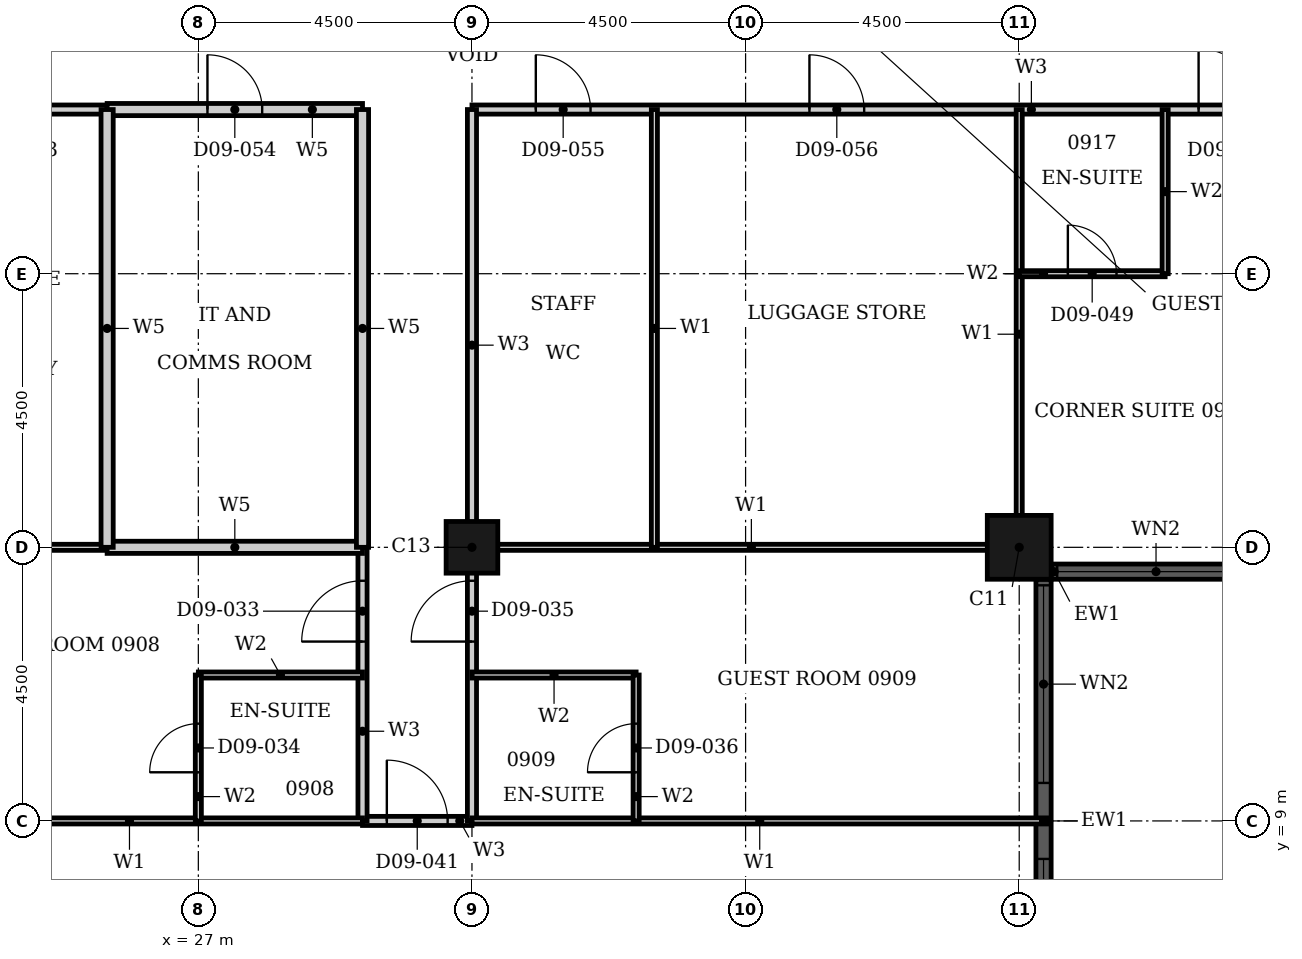
"""IFC4 building model, lengths in metres.
Left out: names, types, materials, properties, quantities, classifications, styles, units other than length and angle.
Written with IfcOpenShell. Run it as: python <this file> out.ifc"""

import sys

from ifc_helpers import new_model, si_unit, direction, frame, frame_2d, origin, origin_2d, place, context, subcontext, project, spatial, rectangle, hollow_rectangle, extrude, element, fill, save


model = new_model("IFC4")
c1 = context("Model", 3, precision=1e-05, world=origin(), true_north=direction((0.0, 1.0)))
c2 = subcontext(c1, "Body", "Model", "MODEL_VIEW")
j1 = project(units=[si_unit("LENGTHUNIT", "METRE"), si_unit("PLANEANGLEUNIT", "RADIAN")], contexts=[c1])
p1 = place(None, origin())
s1 = spatial("IfcSite", under=j1, at=p1, CompositionType="ELEMENT")
p2 = place(p1, origin())
s2 = spatial("IfcBuilding", under=s1, at=p2, CompositionType="ELEMENT")
p3 = place(p2, frame((0.0, 0.0, 44.4)))
s3 = spatial("IfcBuildingStorey", under=s2, at=p3, CompositionType="ELEMENT", Elevation=44.4)
p4 = place(p3, frame((40.5, 13.5, 0.0), z_axis=(0.0, 0.0, 1.0), x_axis=(1.0, 0.0, 0.0)))
e1 = element("IfcColumn", 1, at=p4, inside=s3, PredefinedType="COLUMN", context=c2, shape_type="SweptSolid", body=[
    extrude(hollow_rectangle(XDim=1.05, YDim=1.05, WallThickness=0.034, at=origin_2d()), origin(), (0.0, 0.0, 1.0), 3.6),
])
p5 = place(p3, frame((31.5, 13.5, 0.0), z_axis=(0.0, 0.0, 1.0), x_axis=(1.0, 0.0, 0.0)))
e2 = element("IfcColumn", 2, at=p5, inside=s3, PredefinedType="COLUMN", context=c2, shape_type="SweptSolid", body=[
    extrude(hollow_rectangle(XDim=0.85, YDim=0.85, WallThickness=0.026, at=origin_2d()), origin(), (0.0, 0.0, 1.0), 3.6),
])
p6 = place(p3, frame((40.9, 5.025, 0.0), z_axis=(0.0, 0.0, 1.0), x_axis=(0.0, 1.0, 0.0)))
e3 = element("IfcWall", 3, at=p6, inside=s3, PredefinedType="SOLIDWALL", context=c2, shape_type="SweptSolid", body=[
    extrude(rectangle(XDim=7.95, YDim=0.25, at=frame_2d((3.975, 0.0))), origin(), (0.0, 0.0, 1.0), 3.6),
])
p7 = place(p6, frame((0.1, 0.0, 0.9)))
e4 = element("IfcOpeningElement", 4, at=p7, cuts=e3, PredefinedType="OPENING", context=c2, shape_type="SweptSolid", body=[
    extrude(rectangle(XDim=3.25, YDim=2.08, at=frame_2d((1.625, 1.04))), frame((0.0, 0.135, 0.0), z_axis=(0.0, -1.0, 0.0), x_axis=(1.0, 0.0, 0.0)), (0.0, 0.0, 1.0), 0.27),
])
p8 = place(p6, frame((4.6, 0.0, 0.9)))
e5 = element("IfcOpeningElement", 5, at=p8, cuts=e3, PredefinedType="OPENING", context=c2, shape_type="SweptSolid", body=[
    extrude(rectangle(XDim=3.25, YDim=2.08, at=frame_2d((1.625, 1.04))), frame((0.0, 0.135, 0.0), z_axis=(0.0, -1.0, 0.0), x_axis=(1.0, 0.0, 0.0)), (0.0, 0.0, 1.0), 0.27),
])
p9 = place(p3, frame((41.025, 13.1, 0.0), z_axis=(0.0, 0.0, 1.0), x_axis=(1.0, 0.0, 0.0)))
e6 = element("IfcWall", 6, at=p9, inside=s3, PredefinedType="SOLIDWALL", context=c2, shape_type="SweptSolid", body=[
    extrude(rectangle(XDim=3.45, YDim=0.25, at=frame_2d((1.725, 0.0))), origin(), (0.0, 0.0, 1.0), 3.6),
])
p10 = place(p9, frame((0.1, 0.0, 0.9)))
e7 = element("IfcOpeningElement", 7, at=p10, cuts=e6, PredefinedType="OPENING", context=c2, shape_type="SweptSolid", body=[
    extrude(rectangle(XDim=3.25, YDim=2.08, at=frame_2d((1.625, 1.04))), frame((0.0, 0.135, 0.0), z_axis=(0.0, -1.0, 0.0), x_axis=(1.0, 0.0, 0.0)), (0.0, 0.0, 1.0), 0.27),
])
p11 = place(p3, frame((16.2, 20.7, 0.0), z_axis=(0.0, 0.0, 1.0), x_axis=(1.0, 0.0, 0.0)))
e8 = element("IfcWall", 8, at=p11, inside=s3, PredefinedType="PARTITIONING", context=c2, shape_type="SweptSolid", body=[
    extrude(rectangle(XDim=9.3, YDim=0.15, at=frame_2d((4.65, 0.0))), origin(), (0.0, 0.0, 1.0), 3.2),
])
p12 = place(p11, frame((4.75, 0.0, 0.0)))
e9 = element("IfcOpeningElement", 9, at=p12, cuts=e8, PredefinedType="OPENING", context=c2, shape_type="SweptSolid", body=[
    extrude(rectangle(XDim=1.0, YDim=2.1, at=frame_2d((0.5, 1.05))), frame((0.0, 0.085, 0.0), z_axis=(0.0, -1.0, 0.0), x_axis=(1.0, 0.0, 0.0)), (0.0, 0.0, 1.0), 0.17),
])
p13 = place(p11, frame((7.35, 0.0, 0.0)))
e10 = element("IfcOpeningElement", 10, at=p13, cuts=e8, PredefinedType="OPENING", context=c2, shape_type="SweptSolid", body=[
    extrude(rectangle(XDim=0.9, YDim=2.1, at=frame_2d((0.45, 1.05))), frame((0.0, 0.085, 0.0), z_axis=(0.0, -1.0, 0.0), x_axis=(1.0, 0.0, 0.0)), (0.0, 0.0, 1.0), 0.17),
])
p14 = place(p3, frame((31.5, 20.7, 0.0), z_axis=(0.0, 0.0, 1.0), x_axis=(1.0, 0.0, 0.0)))
e11 = element("IfcWall", 11, at=p14, inside=s3, PredefinedType="PARTITIONING", context=c2, shape_type="SweptSolid", body=[
    extrude(rectangle(XDim=15.3, YDim=0.15, at=frame_2d((7.65, 0.0))), origin(), (0.0, 0.0, 1.0), 3.2),
])
p15 = place(p14, frame((11.95, 0.0, 0.0)))
e12 = element("IfcOpeningElement", 12, at=p15, cuts=e11, PredefinedType="OPENING", context=c2, shape_type="SweptSolid", body=[
    extrude(rectangle(XDim=1.0, YDim=2.1, at=frame_2d((0.5, 1.05))), frame((0.0, 0.085, 0.0), z_axis=(0.0, -1.0, 0.0), x_axis=(1.0, 0.0, 0.0)), (0.0, 0.0, 1.0), 0.17),
])
p16 = place(p14, frame((1.05, 0.0, 0.0)))
e13 = element("IfcOpeningElement", 13, at=p16, cuts=e11, PredefinedType="OPENING", context=c2, shape_type="SweptSolid", body=[
    extrude(rectangle(XDim=0.9, YDim=2.1, at=frame_2d((0.45, 1.05))), frame((0.0, 0.085, 0.0), z_axis=(0.0, -1.0, 0.0), x_axis=(1.0, 0.0, 0.0)), (0.0, 0.0, 1.0), 0.17),
])
p17 = place(p14, frame((5.55, 0.0, 0.0)))
e14 = element("IfcOpeningElement", 14, at=p17, cuts=e11, PredefinedType="OPENING", context=c2, shape_type="SweptSolid", body=[
    extrude(rectangle(XDim=0.9, YDim=2.1, at=frame_2d((0.45, 1.05))), frame((0.0, 0.085, 0.0), z_axis=(0.0, -1.0, 0.0), x_axis=(1.0, 0.0, 0.0)), (0.0, 0.0, 1.0), 0.17),
])
p18 = place(p3, frame((29.7, 9.0, 0.0), z_axis=(0.0, 0.0, 1.0), x_axis=(1.0, 0.0, 0.0)))
e15 = element("IfcWall", 15, at=p18, inside=s3, PredefinedType="PARTITIONING", context=c2, shape_type="SweptSolid", body=[
    extrude(rectangle(XDim=1.8, YDim=0.15, at=frame_2d((0.9, 0.0))), origin(), (0.0, 0.0, 1.0), 3.2),
])
p19 = place(p18, frame((0.4, 0.0, 0.0)))
e16 = element("IfcOpeningElement", 16, at=p19, cuts=e15, PredefinedType="OPENING", context=c2, shape_type="SweptSolid", body=[
    extrude(rectangle(XDim=1.0, YDim=2.1, at=frame_2d((0.5, 1.05))), frame((0.0, 0.085, 0.0), z_axis=(0.0, -1.0, 0.0), x_axis=(1.0, 0.0, 0.0)), (0.0, 0.0, 1.0), 0.17),
])
p20 = place(p3, frame((29.7, 9.0, 0.0), z_axis=(0.0, 0.0, 1.0), x_axis=(0.0, 1.0, 0.0)))
e17 = element("IfcWall", 17, at=p20, inside=s3, PredefinedType="PARTITIONING", context=c2, shape_type="SweptSolid", body=[
    extrude(rectangle(XDim=4.5, YDim=0.15, at=frame_2d((2.25, 0.0))), origin(), (0.0, 0.0, 1.0), 3.2),
])
p21 = place(p20, frame((2.95, 0.0, 0.0)))
e18 = element("IfcOpeningElement", 18, at=p21, cuts=e17, PredefinedType="OPENING", context=c2, shape_type="SweptSolid", body=[
    extrude(rectangle(XDim=1.0, YDim=2.1, at=frame_2d((0.5, 1.05))), frame((0.0, 0.085, 0.0), z_axis=(0.0, -1.0, 0.0), x_axis=(1.0, 0.0, 0.0)), (0.0, 0.0, 1.0), 0.17),
])
p22 = place(p3, frame((31.5, 9.0, 0.0), z_axis=(0.0, 0.0, 1.0), x_axis=(0.0, 1.0, 0.0)))
e19 = element("IfcWall", 19, at=p22, inside=s3, PredefinedType="PARTITIONING", context=c2, shape_type="SweptSolid", body=[
    extrude(rectangle(XDim=11.7, YDim=0.15, at=frame_2d((5.85, 0.0))), origin(), (0.0, 0.0, 1.0), 2.48),
])
p23 = place(p22, frame((2.95, 0.0, 0.0)))
e20 = element("IfcOpeningElement", 20, at=p23, cuts=e19, PredefinedType="OPENING", context=c2, shape_type="SweptSolid", body=[
    extrude(rectangle(XDim=1.0, YDim=2.1, at=frame_2d((0.5, 1.05))), frame((0.0, 0.085, 0.0), z_axis=(0.0, -1.0, 0.0), x_axis=(1.0, 0.0, 0.0)), (0.0, 0.0, 1.0), 0.17),
])
p24 = place(p3, frame((31.5, 13.5, 0.0), z_axis=(0.0, 0.0, 1.0), x_axis=(1.0, 0.0, 0.0)))
e21 = element("IfcWall", 21, at=p24, inside=s3, PredefinedType="PARTITIONING", context=c2, shape_type="SweptSolid", body=[
    extrude(rectangle(XDim=9.19, YDim=0.1, at=frame_2d((4.595, 0.0))), origin(), (0.0, 0.0, 1.0), 2.28),
])
p25 = place(p3, frame((22.31, 13.5, 0.0), z_axis=(0.0, 0.0, 1.0), x_axis=(1.0, 0.0, 0.0)))
e22 = element("IfcWall", 22, at=p25, inside=s3, PredefinedType="PARTITIONING", context=c2, shape_type="SweptSolid", body=[
    extrude(rectangle(XDim=3.19, YDim=0.1, at=frame_2d((1.595, 0.0))), origin(), (0.0, 0.0, 1.0), 2.28),
])
p26 = place(p3, frame((31.5, 9.0, 0.0), z_axis=(0.0, 0.0, 1.0), x_axis=(1.0, 0.0, 0.0)))
e23 = element("IfcWall", 23, at=p26, inside=s3, PredefinedType="PARTITIONING", context=c2, shape_type="SweptSolid", body=[
    extrude(rectangle(XDim=9.465, YDim=0.1, at=frame_2d((4.732, 0.0))), origin(), (0.0, 0.0, 1.0), 3.2),
])
p27 = place(p3, frame((22.035, 9.0, 0.0), z_axis=(0.0, 0.0, 1.0), x_axis=(1.0, 0.0, 0.0)))
e24 = element("IfcWall", 24, at=p27, inside=s3, PredefinedType="PARTITIONING", context=c2, shape_type="SweptSolid", body=[
    extrude(rectangle(XDim=7.665, YDim=0.1, at=frame_2d((3.833, 0.0))), origin(), (0.0, 0.0, 1.0), 3.2),
])
p28 = place(p3, frame((34.5, 13.5, 0.0), z_axis=(0.0, 0.0, 1.0), x_axis=(0.0, 1.0, 0.0)))
e25 = element("IfcWall", 25, at=p28, inside=s3, PredefinedType="PARTITIONING", context=c2, shape_type="SweptSolid", body=[
    extrude(rectangle(XDim=7.2, YDim=0.1, at=frame_2d((3.6, 0.0))), origin(), (0.0, 0.0, 1.0), 3.2),
])
p29 = place(p3, frame((40.5, 13.31, 0.0), z_axis=(0.0, 0.0, 1.0), x_axis=(0.0, 1.0, 0.0)))
e26 = element("IfcWall", 26, at=p29, inside=s3, PredefinedType="PARTITIONING", context=c2, shape_type="SweptSolid", body=[
    extrude(rectangle(XDim=7.39, YDim=0.1, at=frame_2d((3.695, 0.0))), origin(), (0.0, 0.0, 1.0), 3.2),
])
for number, where, z_axis, x_axis in (
    (27, (31.5, 11.4, 0.0), (0.0, 0.0, 1.0), (1.0, 0.0, 0.0)),
    (28, (27.0, 11.4, 0.0), (0.0, 0.0, 1.0), (1.0, 0.0, 0.0)),
):
    element("IfcWall", number, at=place(p3, frame(where, z_axis=z_axis, x_axis=x_axis)), inside=s3, PredefinedType="PARTITIONING", context=c2, shape_type="SweptSolid", body=[
        extrude(rectangle(XDim=2.7, YDim=0.1, at=frame_2d((1.35, 0.0))), origin(), (0.0, 0.0, 1.0), 3.2),
    ])
p30 = place(p3, frame((40.5, 18.0, 0.0), z_axis=(0.0, 0.0, 1.0), x_axis=(1.0, 0.0, 0.0)))
e29 = element("IfcWall", 29, at=p30, inside=s3, PredefinedType="PARTITIONING", context=c2, shape_type="SweptSolid", body=[
    extrude(rectangle(XDim=2.4, YDim=0.1, at=frame_2d((1.2, 0.0))), origin(), (0.0, 0.0, 1.0), 3.2),
])
p31 = place(p30, frame((0.8, 0.0, 0.0)))
e30 = element("IfcOpeningElement", 30, at=p31, cuts=e29, PredefinedType="OPENING", context=c2, shape_type="SweptSolid", body=[
    extrude(rectangle(XDim=0.8, YDim=2.1, at=frame_2d((0.4, 1.05))), frame((0.0, 0.06, 0.0), z_axis=(0.0, -1.0, 0.0), x_axis=(1.0, 0.0, 0.0)), (0.0, 0.0, 1.0), 0.12),
])
p32 = place(p3, frame((27.0, 9.0, 0.0), z_axis=(0.0, 0.0, 1.0), x_axis=(0.0, 1.0, 0.0)))
e31 = element("IfcWall", 31, at=p32, inside=s3, PredefinedType="PARTITIONING", context=c2, shape_type="SweptSolid", body=[
    extrude(rectangle(XDim=2.4, YDim=0.1, at=frame_2d((1.2, 0.0))), origin(), (0.0, 0.0, 1.0), 2.48),
])
p33 = place(p32, frame((0.8, 0.0, 0.0)))
e32 = element("IfcOpeningElement", 32, at=p33, cuts=e31, PredefinedType="OPENING", context=c2, shape_type="SweptSolid", body=[
    extrude(rectangle(XDim=0.8, YDim=2.1, at=frame_2d((0.4, 1.05))), frame((0.0, 0.06, 0.0), z_axis=(0.0, -1.0, 0.0), x_axis=(1.0, 0.0, 0.0)), (0.0, 0.0, 1.0), 0.12),
])
p34 = place(p3, frame((34.2, 9.0, 0.0), z_axis=(0.0, 0.0, 1.0), x_axis=(0.0, 1.0, 0.0)))
e33 = element("IfcWall", 33, at=p34, inside=s3, PredefinedType="PARTITIONING", context=c2, shape_type="SweptSolid", body=[
    extrude(rectangle(XDim=2.4, YDim=0.1, at=frame_2d((1.2, 0.0))), origin(), (0.0, 0.0, 1.0), 3.2),
])
p35 = place(p34, frame((0.8, 0.0, 0.0)))
e34 = element("IfcOpeningElement", 34, at=p35, cuts=e33, PredefinedType="OPENING", context=c2, shape_type="SweptSolid", body=[
    extrude(rectangle(XDim=0.8, YDim=2.1, at=frame_2d((0.4, 1.05))), frame((0.0, 0.06, 0.0), z_axis=(0.0, -1.0, 0.0), x_axis=(1.0, 0.0, 0.0)), (0.0, 0.0, 1.0), 0.12),
])
p36 = place(p3, frame((42.9, 18.0, 0.0), z_axis=(0.0, 0.0, 1.0), x_axis=(0.0, 1.0, 0.0)))
e35 = element("IfcWall", 35, at=p36, inside=s3, PredefinedType="PARTITIONING", context=c2, shape_type="SweptSolid", body=[
    extrude(rectangle(XDim=2.7, YDim=0.1, at=frame_2d((1.35, 0.0))), origin(), (0.0, 0.0, 1.0), 3.2),
])
p37 = place(p3, frame((25.5, 13.5, 0.0), z_axis=(0.0, 0.0, 1.0), x_axis=(1.0, 0.0, 0.0)))
e36 = element("IfcWall", 36, at=p37, inside=s3, PredefinedType="PARTITIONING", context=c2, shape_type="SweptSolid", body=[
    extrude(rectangle(XDim=4.2, YDim=0.2, at=frame_2d((2.1, 0.0))), origin(), (0.0, 0.0, 1.0), 2.28),
])
p38 = place(p3, frame((25.5, 20.7, 0.0), z_axis=(0.0, 0.0, 1.0), x_axis=(1.0, 0.0, 0.0)))
e37 = element("IfcWall", 37, at=p38, inside=s3, PredefinedType="PARTITIONING", context=c2, shape_type="SweptSolid", body=[
    extrude(rectangle(XDim=4.2, YDim=0.2, at=frame_2d((2.1, 0.0))), origin(), (0.0, 0.0, 1.0), 3.2),
])
p39 = place(p38, frame((1.65, 0.0, 0.0)))
e38 = element("IfcOpeningElement", 38, at=p39, cuts=e37, PredefinedType="OPENING", context=c2, shape_type="SweptSolid", body=[
    extrude(rectangle(XDim=0.9, YDim=2.1, at=frame_2d((0.45, 1.05))), frame((0.0, 0.11, 0.0), z_axis=(0.0, -1.0, 0.0), x_axis=(1.0, 0.0, 0.0)), (0.0, 0.0, 1.0), 0.22),
])
for number, where, z_axis, x_axis in (
    (39, (25.5, 13.5, 0.0), (0.0, 0.0, 1.0), (0.0, 1.0, 0.0)),
    (40, (29.7, 13.5, 0.0), (0.0, 0.0, 1.0), (0.0, 1.0, 0.0)),
):
    element("IfcWall", number, at=place(p3, frame(where, z_axis=z_axis, x_axis=x_axis)), inside=s3, PredefinedType="PARTITIONING", context=c2, shape_type="SweptSolid", body=[
        extrude(rectangle(XDim=7.2, YDim=0.2, at=frame_2d((3.6, 0.0))), origin(), (0.0, 0.0, 1.0), 3.2),
    ])
p40 = place(p7, origin())
e41 = element("IfcWindow", 41, at=p40, inside=s3, PartitioningType="SINGLE_PANEL", PredefinedType="WINDOW", context=c2, shape_type="SweptSolid", body=[
    extrude(rectangle(XDim=3.25, YDim=2.08, at=frame_2d((1.625, 1.04))), frame((0.0, 0.03, 0.0), z_axis=(0.0, -1.0, 0.0), x_axis=(1.0, 0.0, 0.0)), (0.0, 0.0, 1.0), 0.06),
])
fill(e4, e41)
p41 = place(p8, origin())
e42 = element("IfcWindow", 42, at=p41, inside=s3, PartitioningType="SINGLE_PANEL", PredefinedType="WINDOW", context=c2, shape_type="SweptSolid", body=[
    extrude(rectangle(XDim=3.25, YDim=2.08, at=frame_2d((1.625, 1.04))), frame((0.0, 0.03, 0.0), z_axis=(0.0, -1.0, 0.0), x_axis=(1.0, 0.0, 0.0)), (0.0, 0.0, 1.0), 0.06),
])
fill(e5, e42)
p42 = place(p10, origin())
e43 = element("IfcWindow", 43, at=p42, inside=s3, PartitioningType="SINGLE_PANEL", PredefinedType="WINDOW", context=c2, shape_type="SweptSolid", body=[
    extrude(rectangle(XDim=3.25, YDim=2.08, at=frame_2d((1.625, 1.04))), frame((0.0, 0.03, 0.0), z_axis=(0.0, -1.0, 0.0), x_axis=(1.0, 0.0, 0.0)), (0.0, 0.0, 1.0), 0.06),
])
fill(e7, e43)
p43 = place(p21, origin())
e44 = element("IfcDoor", 44, at=p43, inside=s3, OperationType="SINGLE_SWING_RIGHT", PredefinedType="DOOR", context=c2, shape_type="SweptSolid", body=[
    extrude(rectangle(XDim=1.0, YDim=2.1, at=frame_2d((0.5, 1.05))), frame((0.0, 0.025, 0.0), z_axis=(0.0, -1.0, 0.0), x_axis=(1.0, 0.0, 0.0)), (0.0, 0.0, 1.0), 0.05),
])
fill(e18, e44)
p44 = place(p33, origin())
e45 = element("IfcDoor", 45, at=p44, inside=s3, OperationType="SINGLE_SWING_RIGHT", PredefinedType="DOOR", context=c2, shape_type="SweptSolid", body=[
    extrude(rectangle(XDim=0.8, YDim=2.1, at=frame_2d((0.4, 1.05))), frame((0.0, 0.025, 0.0), z_axis=(0.0, -1.0, 0.0), x_axis=(1.0, 0.0, 0.0)), (0.0, 0.0, 1.0), 0.05),
])
fill(e32, e45)
p45 = place(p23, origin())
e46 = element("IfcDoor", 46, at=p45, inside=s3, OperationType="SINGLE_SWING_RIGHT", PredefinedType="DOOR", context=c2, shape_type="SweptSolid", body=[
    extrude(rectangle(XDim=1.0, YDim=2.1, at=frame_2d((0.5, 1.05))), frame((0.0, 0.025, 0.0), z_axis=(0.0, -1.0, 0.0), x_axis=(1.0, 0.0, 0.0)), (0.0, 0.0, 1.0), 0.05),
])
fill(e20, e46)
p46 = place(p35, origin())
e47 = element("IfcDoor", 47, at=p46, inside=s3, OperationType="SINGLE_SWING_RIGHT", PredefinedType="DOOR", context=c2, shape_type="SweptSolid", body=[
    extrude(rectangle(XDim=0.8, YDim=2.1, at=frame_2d((0.4, 1.05))), frame((0.0, 0.025, 0.0), z_axis=(0.0, -1.0, 0.0), x_axis=(1.0, 0.0, 0.0)), (0.0, 0.0, 1.0), 0.05),
])
fill(e34, e47)
p47 = place(p19, origin())
e48 = element("IfcDoor", 48, at=p47, inside=s3, OperationType="SINGLE_SWING_LEFT", PredefinedType="DOOR", context=c2, shape_type="SweptSolid", body=[
    extrude(rectangle(XDim=1.0, YDim=2.1, at=frame_2d((0.5, 1.05))), frame((0.0, 0.025, 0.0), z_axis=(0.0, -1.0, 0.0), x_axis=(1.0, 0.0, 0.0)), (0.0, 0.0, 1.0), 0.05),
])
fill(e16, e48)
p48 = place(p15, origin())
e49 = element("IfcDoor", 49, at=p48, inside=s3, OperationType="SINGLE_SWING_RIGHT", PredefinedType="DOOR", context=c2, shape_type="SweptSolid", body=[
    extrude(rectangle(XDim=1.0, YDim=2.1, at=frame_2d((0.5, 1.05))), frame((0.0, 0.025, 0.0), z_axis=(0.0, -1.0, 0.0), x_axis=(1.0, 0.0, 0.0)), (0.0, 0.0, 1.0), 0.05),
])
fill(e12, e49)
p49 = place(p31, origin())
e50 = element("IfcDoor", 50, at=p49, inside=s3, OperationType="SINGLE_SWING_RIGHT", PredefinedType="DOOR", context=c2, shape_type="SweptSolid", body=[
    extrude(rectangle(XDim=0.8, YDim=2.1, at=frame_2d((0.4, 1.05))), frame((0.0, 0.025, 0.0), z_axis=(0.0, -1.0, 0.0), x_axis=(1.0, 0.0, 0.0)), (0.0, 0.0, 1.0), 0.05),
])
fill(e30, e50)
p50 = place(p39, origin())
e51 = element("IfcDoor", 51, at=p50, inside=s3, OperationType="SINGLE_SWING_LEFT", PredefinedType="DOOR", context=c2, shape_type="SweptSolid", body=[
    extrude(rectangle(XDim=0.9, YDim=2.1, at=frame_2d((0.45, 1.05))), frame((0.0, 0.025, 0.0), z_axis=(0.0, -1.0, 0.0), x_axis=(1.0, 0.0, 0.0)), (0.0, 0.0, 1.0), 0.05),
])
fill(e38, e51)
p51 = place(p16, origin())
e52 = element("IfcDoor", 52, at=p51, inside=s3, OperationType="SINGLE_SWING_LEFT", PredefinedType="DOOR", context=c2, shape_type="SweptSolid", body=[
    extrude(rectangle(XDim=0.9, YDim=2.1, at=frame_2d((0.45, 1.05))), frame((0.0, 0.025, 0.0), z_axis=(0.0, -1.0, 0.0), x_axis=(1.0, 0.0, 0.0)), (0.0, 0.0, 1.0), 0.05),
])
fill(e13, e52)
p52 = place(p17, origin())
e53 = element("IfcDoor", 53, at=p52, inside=s3, OperationType="SINGLE_SWING_LEFT", PredefinedType="DOOR", context=c2, shape_type="SweptSolid", body=[
    extrude(rectangle(XDim=0.9, YDim=2.1, at=frame_2d((0.45, 1.05))), frame((0.0, 0.025, 0.0), z_axis=(0.0, -1.0, 0.0), x_axis=(1.0, 0.0, 0.0)), (0.0, 0.0, 1.0), 0.05),
])
fill(e14, e53)
save(model, sys.argv[1])
